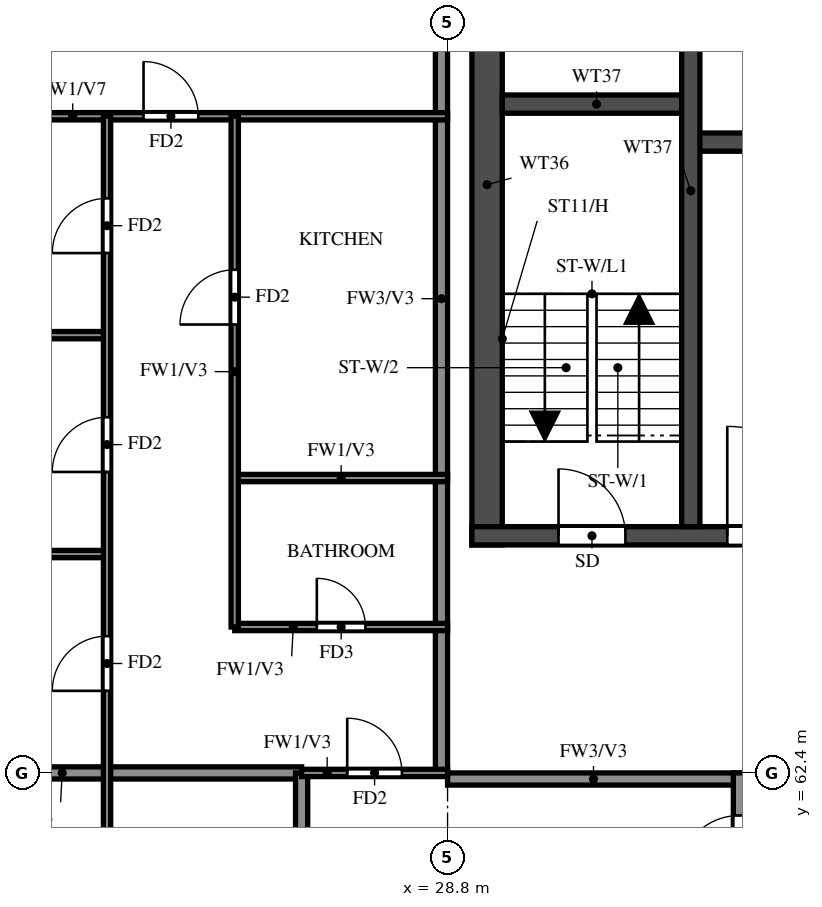
"""IFC4 building model, lengths in metres.
Left out: names, types, materials, properties, quantities, classifications, styles, units other than length and angle.
Written with IfcOpenShell. Run it as: python <this file> out.ifc"""

import sys

from ifc_helpers import new_model, si_unit, direction, frame, frame_2d, origin, place, context, subcontext, project, spatial, rectangle, extrude, element, fill, save


model = new_model("IFC4")
c1 = context("Model", 3, precision=1e-05, world=origin(), true_north=direction((0.0, 1.0)))
c2 = subcontext(c1, "Body", "Model", "MODEL_VIEW")
j1 = project(units=[si_unit("LENGTHUNIT", "METRE"), si_unit("PLANEANGLEUNIT", "RADIAN")], contexts=[c1])
p1 = place(None, origin())
s1 = spatial("IfcSite", under=j1, at=p1, CompositionType="ELEMENT")
p2 = place(p1, origin())
s2 = spatial("IfcBuilding", under=s1, at=p2, CompositionType="ELEMENT")
p3 = place(p2, frame((0.0, 0.0, 229.0)))
s3 = spatial("IfcBuildingStorey", under=s2, at=p3, CompositionType="ELEMENT", Elevation=229.0)
p4 = place(p3, frame((29.45, 66.15, 0.0), z_axis=(0.0, 0.0, 1.0), x_axis=(0.0, 1.0, 0.0)))
e1 = element("IfcWall", 1, at=p4, inside=s3, PredefinedType="SHEAR", context=c2, shape_type="SweptSolid", body=[
    extrude(rectangle(XDim=11.85, YDim=0.5, at=frame_2d((5.925, 0.0))), origin(), (0.0, 0.0, 1.0), 3.22),
])
p5 = place(p3, frame((29.2, 66.3, 0.0), z_axis=(0.0, 0.0, 1.0), x_axis=(1.0, 0.0, 0.0)))
e2 = element("IfcWall", 2, at=p5, inside=s3, PredefinedType="SHEAR", context=c2, shape_type="SweptSolid", body=[
    extrude(rectangle(XDim=42.4, YDim=0.3, at=frame_2d((21.2, 0.0))), origin(), (0.0, 0.0, 1.0), 3.22),
])
p6 = place(p5, frame((1.425, 0.0, 0.0)))
e3 = element("IfcOpeningElement", 3, at=p6, cuts=e2, PredefinedType="OPENING", context=c2, shape_type="SweptSolid", body=[
    extrude(rectangle(XDim=1.1, YDim=2.1, at=frame_2d((0.55, 1.05))), frame((0.0, 0.16, 0.0), z_axis=(0.0, -1.0, 0.0), x_axis=(1.0, 0.0, 0.0)), (0.0, 0.0, 1.0), 0.32),
])
p7 = place(p5, frame((4.2, 0.0, 0.0)))
e4 = element("IfcOpeningElement", 4, at=p7, cuts=e2, PredefinedType="OPENING", context=c2, shape_type="SweptSolid", body=[
    extrude(rectangle(XDim=1.8, YDim=2.1, at=frame_2d((0.9, 1.05))), frame((0.0, 0.16, 0.0), z_axis=(0.0, -1.0, 0.0), x_axis=(1.0, 0.0, 0.0)), (0.0, 0.0, 1.0), 0.32),
])
p8 = place(p3, frame((32.8, 72.775, 0.0), z_axis=(0.0, 0.0, 1.0), x_axis=(1.0, 0.0, 0.0)))
e5 = element("IfcWall", 5, at=p8, inside=s3, PredefinedType="SHEAR", context=c2, shape_type="SweptSolid", body=[
    extrude(rectangle(XDim=35.2, YDim=0.3, at=frame_2d((17.6, 0.0))), origin(), (0.0, 0.0, 1.0), 3.22),
])
p9 = place(p8, frame((19.8, 0.0, 0.0)))
e6 = element("IfcOpeningElement", 6, at=p9, cuts=e5, PredefinedType="OPENING", context=c2, shape_type="SweptSolid", body=[
    extrude(rectangle(XDim=1.1, YDim=2.1, at=frame_2d((0.55, 1.05))), frame((0.0, 0.16, 0.0), z_axis=(0.0, -1.0, 0.0), x_axis=(1.0, 0.0, 0.0)), (0.0, 0.0, 1.0), 0.32),
])
p10 = place(p8, frame((27.725, 0.0, 0.0)))
e7 = element("IfcOpeningElement", 7, at=p10, cuts=e5, PredefinedType="OPENING", context=c2, shape_type="SweptSolid", body=[
    extrude(rectangle(XDim=1.1, YDim=2.1, at=frame_2d((0.55, 1.05))), frame((0.0, 0.16, 0.0), z_axis=(0.0, -1.0, 0.0), x_axis=(1.0, 0.0, 0.0)), (0.0, 0.0, 1.0), 0.32),
])
p11 = place(p8, frame((30.325, 0.0, 0.0)))
e8 = element("IfcOpeningElement", 8, at=p11, cuts=e5, PredefinedType="OPENING", context=c2, shape_type="SweptSolid", body=[
    extrude(rectangle(XDim=1.1, YDim=2.1, at=frame_2d((0.55, 1.05))), frame((0.0, 0.16, 0.0), z_axis=(0.0, -1.0, 0.0), x_axis=(1.0, 0.0, 0.0)), (0.0, 0.0, 1.0), 0.32),
])
p12 = place(p8, frame((3.825, 0.0, 0.0)))
e9 = element("IfcOpeningElement", 9, at=p12, cuts=e5, PredefinedType="OPENING", context=c2, shape_type="SweptSolid", body=[
    extrude(rectangle(XDim=1.1, YDim=2.1, at=frame_2d((0.55, 1.05))), frame((0.0, 0.16, 0.0), z_axis=(0.0, -1.0, 0.0), x_axis=(1.0, 0.0, 0.0)), (0.0, 0.0, 1.0), 0.32),
])
p13 = place(p8, frame((6.575, 0.0, 0.0)))
e10 = element("IfcOpeningElement", 10, at=p13, cuts=e5, PredefinedType="OPENING", context=c2, shape_type="SweptSolid", body=[
    extrude(rectangle(XDim=1.1, YDim=2.1, at=frame_2d((0.55, 1.05))), frame((0.0, 0.16, 0.0), z_axis=(0.0, -1.0, 0.0), x_axis=(1.0, 0.0, 0.0)), (0.0, 0.0, 1.0), 0.32),
])
p14 = place(p8, frame((9.325, 0.0, 0.0)))
e11 = element("IfcOpeningElement", 11, at=p14, cuts=e5, PredefinedType="OPENING", context=c2, shape_type="SweptSolid", body=[
    extrude(rectangle(XDim=1.1, YDim=2.1, at=frame_2d((0.55, 1.05))), frame((0.0, 0.16, 0.0), z_axis=(0.0, -1.0, 0.0), x_axis=(1.0, 0.0, 0.0)), (0.0, 0.0, 1.0), 0.32),
])
p15 = place(p8, frame((12.075, 0.0, 0.0)))
e12 = element("IfcOpeningElement", 12, at=p15, cuts=e5, PredefinedType="OPENING", context=c2, shape_type="SweptSolid", body=[
    extrude(rectangle(XDim=1.1, YDim=2.1, at=frame_2d((0.55, 1.05))), frame((0.0, 0.16, 0.0), z_axis=(0.0, -1.0, 0.0), x_axis=(1.0, 0.0, 0.0)), (0.0, 0.0, 1.0), 0.32),
])
p16 = place(p8, frame((14.825, 0.0, 0.0)))
e13 = element("IfcOpeningElement", 13, at=p16, cuts=e5, PredefinedType="OPENING", context=c2, shape_type="SweptSolid", body=[
    extrude(rectangle(XDim=1.1, YDim=2.1, at=frame_2d((0.55, 1.05))), frame((0.0, 0.16, 0.0), z_axis=(0.0, -1.0, 0.0), x_axis=(1.0, 0.0, 0.0)), (0.0, 0.0, 1.0), 0.32),
])
p17 = place(p8, frame((17.575, 0.0, 0.0)))
e14 = element("IfcOpeningElement", 14, at=p17, cuts=e5, PredefinedType="OPENING", context=c2, shape_type="SweptSolid", body=[
    extrude(rectangle(XDim=1.1, YDim=2.1, at=frame_2d((0.55, 1.05))), frame((0.0, 0.16, 0.0), z_axis=(0.0, -1.0, 0.0), x_axis=(1.0, 0.0, 0.0)), (0.0, 0.0, 1.0), 0.32),
])
p18 = place(p8, frame((0.95, 0.0, 0.0)))
e15 = element("IfcOpeningElement", 15, at=p18, cuts=e5, PredefinedType="OPENING", context=c2, shape_type="SweptSolid", body=[
    extrude(rectangle(XDim=1.1, YDim=2.1, at=frame_2d((0.55, 1.05))), frame((0.0, 0.16, 0.0), z_axis=(0.0, -1.0, 0.0), x_axis=(1.0, 0.0, 0.0)), (0.0, 0.0, 1.0), 0.32),
])
p19 = place(p3, frame((29.7, 73.4, 0.0), z_axis=(0.0, 0.0, 1.0), x_axis=(1.0, 0.0, 0.0)))
e16 = element("IfcWall", 16, at=p19, inside=s3, PredefinedType="SHEAR", context=c2, shape_type="SweptSolid", body=[
    extrude(rectangle(XDim=3.1, YDim=0.3, at=frame_2d((1.55, 0.0))), origin(), (0.0, 0.0, 1.0), 3.22),
])
p20 = place(p3, frame((32.8, 66.45, 0.0), z_axis=(0.0, 0.0, 1.0), x_axis=(0.0, 1.0, 0.0)))
e17 = element("IfcWall", 17, at=p20, inside=s3, PredefinedType="SHEAR", context=c2, shape_type="SweptSolid", body=[
    extrude(rectangle(XDim=11.05, YDim=0.3, at=frame_2d((5.525, 0.0))), origin(), (0.0, 0.0, 1.0), 3.22),
])
p21 = place(p3, frame((28.8, 62.3, 0.0), z_axis=(0.0, 0.0, 1.0), x_axis=(1.0, 0.0, 0.0)))
e18 = element("IfcWall", 18, at=p21, inside=s3, PredefinedType="SOLIDWALL", context=c2, shape_type="SweptSolid", body=[
    extrude(rectangle(XDim=4.8, YDim=0.2, at=frame_2d((2.4, 0.0))), origin(), (0.0, 0.0, 1.0), 3.22),
])
p22 = place(p3, frame((28.7, 62.4, 0.0), z_axis=(0.0, 0.0, 1.0), x_axis=(0.0, 1.0, 0.0)))
e19 = element("IfcWall", 19, at=p22, inside=s3, PredefinedType="SOLIDWALL", context=c2, shape_type="SweptSolid", body=[
    extrude(rectangle(XDim=15.6, YDim=0.2, at=frame_2d((7.8, 0.0))), origin(), (0.0, 0.0, 1.0), 3.22),
])
p23 = place(p3, frame((33.6, 60.0, 0.0), z_axis=(0.0, 0.0, 1.0), x_axis=(0.0, 1.0, 0.0)))
e20 = element("IfcWall", 20, at=p23, inside=s3, PredefinedType="SOLIDWALL", context=c2, shape_type="SweptSolid", body=[
    extrude(rectangle(XDim=2.4, YDim=0.2, at=frame_2d((1.2, 0.0))), origin(), (0.0, 0.0, 1.0), 3.22),
])
p24 = place(p23, frame((0.7, 0.0, 0.0)))
e21 = element("IfcOpeningElement", 21, at=p24, cuts=e20, PredefinedType="OPENING", context=c2, shape_type="SweptSolid", body=[
    extrude(rectangle(XDim=1.0, YDim=2.1, at=frame_2d((0.5, 1.05))), frame((0.0, 0.11, 0.0), z_axis=(0.0, -1.0, 0.0), x_axis=(1.0, 0.0, 0.0)), (0.0, 0.0, 1.0), 0.22),
])
p25 = place(p3, frame((18.525, 62.4, 0.0), z_axis=(0.0, 0.0, 1.0), x_axis=(1.0, 0.0, 0.0)))
e22 = element("IfcWall", 22, at=p25, inside=s3, PredefinedType="SOLIDWALL", context=c2, shape_type="SweptSolid", body=[
    extrude(rectangle(XDim=7.875, YDim=0.2, at=frame_2d((3.938, 0.0))), origin(), (0.0, 0.0, 1.0), 3.22),
])
p26 = place(p3, frame((26.4, 60.0, 0.0), z_axis=(0.0, 0.0, 1.0), x_axis=(0.0, 1.0, 0.0)))
e23 = element("IfcWall", 23, at=p26, inside=s3, PredefinedType="SOLIDWALL", context=c2, shape_type="SweptSolid", body=[
    extrude(rectangle(XDim=2.4, YDim=0.2, at=frame_2d((1.2, 0.0))), origin(), (0.0, 0.0, 1.0), 3.22),
])
p27 = place(p3, frame((26.4, 62.4, 0.0), z_axis=(0.0, 0.0, 1.0), x_axis=(1.0, 0.0, 0.0)))
e24 = element("IfcWall", 24, at=p27, inside=s3, PredefinedType="PARTITIONING", context=c2, shape_type="SweptSolid", body=[
    extrude(rectangle(XDim=2.4, YDim=0.12, at=frame_2d((1.2, 0.0))), origin(), (0.0, 0.0, 1.0), 3.22),
])
p28 = place(p27, frame((0.75, 0.0, 0.0)))
e25 = element("IfcOpeningElement", 25, at=p28, cuts=e24, PredefinedType="OPENING", context=c2, shape_type="SweptSolid", body=[
    extrude(rectangle(XDim=0.9, YDim=2.1, at=frame_2d((0.45, 1.05))), frame((0.0, 0.07, 0.0), z_axis=(0.0, -1.0, 0.0), x_axis=(1.0, 0.0, 0.0)), (0.0, 0.0, 1.0), 0.14),
])
p29 = place(p3, frame((25.3, 64.8, 0.0), z_axis=(0.0, 0.0, 1.0), x_axis=(1.0, 0.0, 0.0)))
e26 = element("IfcWall", 26, at=p29, inside=s3, PredefinedType="PARTITIONING", context=c2, shape_type="SweptSolid", body=[
    extrude(rectangle(XDim=3.5, YDim=0.12, at=frame_2d((1.75, 0.0))), origin(), (0.0, 0.0, 1.0), 3.22),
])
p30 = place(p29, frame((1.35, 0.0, 0.0)))
e27 = element("IfcOpeningElement", 27, at=p30, cuts=e26, PredefinedType="OPENING", context=c2, shape_type="SweptSolid", body=[
    extrude(rectangle(XDim=0.8, YDim=2.1, at=frame_2d((0.4, 1.05))), frame((0.0, 0.07, 0.0), z_axis=(0.0, -1.0, 0.0), x_axis=(1.0, 0.0, 0.0)), (0.0, 0.0, 1.0), 0.14),
])
p31 = place(p3, frame((18.525, 66.0, 0.0), z_axis=(0.0, 0.0, 1.0), x_axis=(1.0, 0.0, 0.0)))
e28 = element("IfcWall", 28, at=p31, inside=s3, PredefinedType="PARTITIONING", context=c2, shape_type="SweptSolid", body=[
    extrude(rectangle(XDim=4.675, YDim=0.12, at=frame_2d((2.337, 0.0))), origin(), (0.0, 0.0, 1.0), 2.32),
])
p32 = place(p3, frame((25.3, 67.25, 0.0), z_axis=(0.0, 0.0, 1.0), x_axis=(1.0, 0.0, 0.0)))
e29 = element("IfcWall", 29, at=p32, inside=s3, PredefinedType="PARTITIONING", context=c2, shape_type="SweptSolid", body=[
    extrude(rectangle(XDim=3.5, YDim=0.12, at=frame_2d((1.75, 0.0))), origin(), (0.0, 0.0, 1.0), 3.22),
])
p33 = place(p3, frame((18.525, 69.6, 0.0), z_axis=(0.0, 0.0, 1.0), x_axis=(1.0, 0.0, 0.0)))
e30 = element("IfcWall", 30, at=p33, inside=s3, PredefinedType="PARTITIONING", context=c2, shape_type="SweptSolid", body=[
    extrude(rectangle(XDim=4.675, YDim=0.12, at=frame_2d((2.337, 0.0))), origin(), (0.0, 0.0, 1.0), 3.22),
])
p34 = place(p3, frame((18.525, 73.2, 0.0), z_axis=(0.0, 0.0, 1.0), x_axis=(1.0, 0.0, 0.0)))
e31 = element("IfcWall", 31, at=p34, inside=s3, PredefinedType="PARTITIONING", context=c2, shape_type="SweptSolid", body=[
    extrude(rectangle(XDim=10.275, YDim=0.12, at=frame_2d((5.138, 0.0))), origin(), (0.0, 0.0, 1.0), 2.32),
])
p35 = place(p34, frame((5.275, 0.0, 0.0)))
e32 = element("IfcOpeningElement", 32, at=p35, cuts=e31, PredefinedType="OPENING", context=c2, shape_type="SweptSolid", body=[
    extrude(rectangle(XDim=0.9, YDim=2.1, at=frame_2d((0.45, 1.05))), frame((0.0, 0.07, 0.0), z_axis=(0.0, -1.0, 0.0), x_axis=(1.0, 0.0, 0.0)), (0.0, 0.0, 1.0), 0.14),
])
p36 = place(p3, frame((23.2, 48.0, 0.0), z_axis=(0.0, 0.0, 1.0), x_axis=(0.0, 1.0, 0.0)))
e33 = element("IfcWall", 33, at=p36, inside=s3, PredefinedType="PARTITIONING", context=c2, shape_type="SweptSolid", body=[
    extrude(rectangle(XDim=25.2, YDim=0.12, at=frame_2d((12.6, 0.0))), origin(), (0.0, 0.0, 1.0), 3.22),
])
p37 = place(p36, frame((1.35, 0.0, 0.0)))
e34 = element("IfcOpeningElement", 34, at=p37, cuts=e33, PredefinedType="OPENING", context=c2, shape_type="SweptSolid", body=[
    extrude(rectangle(XDim=0.9, YDim=2.1, at=frame_2d((0.45, 1.05))), frame((0.0, 0.07, 0.0), z_axis=(0.0, -1.0, 0.0), x_axis=(1.0, 0.0, 0.0)), (0.0, 0.0, 1.0), 0.14),
])
p38 = place(p36, frame((4.95, 0.0, 0.0)))
e35 = element("IfcOpeningElement", 35, at=p38, cuts=e33, PredefinedType="OPENING", context=c2, shape_type="SweptSolid", body=[
    extrude(rectangle(XDim=0.9, YDim=2.1, at=frame_2d((0.45, 1.05))), frame((0.0, 0.07, 0.0), z_axis=(0.0, -1.0, 0.0), x_axis=(1.0, 0.0, 0.0)), (0.0, 0.0, 1.0), 0.14),
])
p39 = place(p36, frame((10.05, 0.0, 0.0)))
e36 = element("IfcOpeningElement", 36, at=p39, cuts=e33, PredefinedType="OPENING", context=c2, shape_type="SweptSolid", body=[
    extrude(rectangle(XDim=1.5, YDim=2.1, at=frame_2d((0.75, 1.05))), frame((0.0, 0.07, 0.0), z_axis=(0.0, -1.0, 0.0), x_axis=(1.0, 0.0, 0.0)), (0.0, 0.0, 1.0), 0.14),
])
p40 = place(p36, frame((15.75, 0.0, 0.0)))
e37 = element("IfcOpeningElement", 37, at=p40, cuts=e33, PredefinedType="OPENING", context=c2, shape_type="SweptSolid", body=[
    extrude(rectangle(XDim=0.9, YDim=2.1, at=frame_2d((0.45, 1.05))), frame((0.0, 0.07, 0.0), z_axis=(0.0, -1.0, 0.0), x_axis=(1.0, 0.0, 0.0)), (0.0, 0.0, 1.0), 0.14),
])
p41 = place(p36, frame((19.35, 0.0, 0.0)))
e38 = element("IfcOpeningElement", 38, at=p41, cuts=e33, PredefinedType="OPENING", context=c2, shape_type="SweptSolid", body=[
    extrude(rectangle(XDim=0.9, YDim=2.1, at=frame_2d((0.45, 1.05))), frame((0.0, 0.07, 0.0), z_axis=(0.0, -1.0, 0.0), x_axis=(1.0, 0.0, 0.0)), (0.0, 0.0, 1.0), 0.14),
])
p42 = place(p36, frame((22.95, 0.0, 0.0)))
e39 = element("IfcOpeningElement", 39, at=p42, cuts=e33, PredefinedType="OPENING", context=c2, shape_type="SweptSolid", body=[
    extrude(rectangle(XDim=0.9, YDim=2.1, at=frame_2d((0.45, 1.05))), frame((0.0, 0.07, 0.0), z_axis=(0.0, -1.0, 0.0), x_axis=(1.0, 0.0, 0.0)), (0.0, 0.0, 1.0), 0.14),
])
p43 = place(p3, frame((25.3, 64.8, 0.0), z_axis=(0.0, 0.0, 1.0), x_axis=(0.0, 1.0, 0.0)))
e40 = element("IfcWall", 40, at=p43, inside=s3, PredefinedType="PARTITIONING", context=c2, shape_type="SweptSolid", body=[
    extrude(rectangle(XDim=8.4, YDim=0.12, at=frame_2d((4.2, 0.0))), origin(), (0.0, 0.0, 1.0), 3.22),
])
p44 = place(p43, frame((4.975, 0.0, 0.0)))
e41 = element("IfcOpeningElement", 41, at=p44, cuts=e40, PredefinedType="OPENING", context=c2, shape_type="SweptSolid", body=[
    extrude(rectangle(XDim=0.9, YDim=2.1, at=frame_2d((0.45, 1.05))), frame((0.0, 0.07, 0.0), z_axis=(0.0, -1.0, 0.0), x_axis=(1.0, 0.0, 0.0)), (0.0, 0.0, 1.0), 0.14),
])
p45 = place(p6, origin())
e42 = element("IfcDoor", 42, at=p45, inside=s3, OperationType="SINGLE_SWING_LEFT", PredefinedType="DOOR", context=c2, shape_type="SweptSolid", body=[
    extrude(rectangle(XDim=1.1, YDim=2.1, at=frame_2d((0.55, 1.05))), frame((0.0, 0.025, 0.0), z_axis=(0.0, -1.0, 0.0), x_axis=(1.0, 0.0, 0.0)), (0.0, 0.0, 1.0), 0.05),
])
fill(e3, e42)
p46 = place(p7, origin())
e43 = element("IfcDoor", 43, at=p46, inside=s3, OperationType="DOUBLE_DOOR_SINGLE_SWING", PredefinedType="DOOR", context=c2, shape_type="SweptSolid", body=[
    extrude(rectangle(XDim=1.8, YDim=2.1, at=frame_2d((0.9, 1.05))), frame((0.0, 0.025, 0.0), z_axis=(0.0, -1.0, 0.0), x_axis=(1.0, 0.0, 0.0)), (0.0, 0.0, 1.0), 0.05),
])
fill(e4, e43)
p47 = place(p28, origin())
e44 = element("IfcDoor", 44, at=p47, inside=s3, OperationType="SINGLE_SWING_RIGHT", PredefinedType="DOOR", context=c2, shape_type="SweptSolid", body=[
    extrude(rectangle(XDim=0.9, YDim=2.1, at=frame_2d((0.45, 1.05))), frame((0.0, 0.025, 0.0), z_axis=(0.0, -1.0, 0.0), x_axis=(1.0, 0.0, 0.0)), (0.0, 0.0, 1.0), 0.05),
])
fill(e25, e44)
p48 = place(p24, origin())
e45 = element("IfcDoor", 45, at=p48, inside=s3, OperationType="SINGLE_SWING_LEFT", PredefinedType="DOOR", context=c2, shape_type="SweptSolid", body=[
    extrude(rectangle(XDim=1.0, YDim=2.1, at=frame_2d((0.5, 1.05))), frame((0.0, 0.025, 0.0), z_axis=(0.0, -1.0, 0.0), x_axis=(1.0, 0.0, 0.0)), (0.0, 0.0, 1.0), 0.05),
])
fill(e21, e45)
p49 = place(p40, origin())
e46 = element("IfcDoor", 46, at=p49, inside=s3, OperationType="SINGLE_SWING_LEFT", PredefinedType="DOOR", context=c2, shape_type="SweptSolid", body=[
    extrude(rectangle(XDim=0.9, YDim=2.1, at=frame_2d((0.45, 1.05))), frame((0.0, 0.025, 0.0), z_axis=(0.0, -1.0, 0.0), x_axis=(1.0, 0.0, 0.0)), (0.0, 0.0, 1.0), 0.05),
])
fill(e37, e46)
p50 = place(p41, origin())
e47 = element("IfcDoor", 47, at=p50, inside=s3, OperationType="SINGLE_SWING_RIGHT", PredefinedType="DOOR", context=c2, shape_type="SweptSolid", body=[
    extrude(rectangle(XDim=0.9, YDim=2.1, at=frame_2d((0.45, 1.05))), frame((0.0, 0.025, 0.0), z_axis=(0.0, -1.0, 0.0), x_axis=(1.0, 0.0, 0.0)), (0.0, 0.0, 1.0), 0.05),
])
fill(e38, e47)
p51 = place(p42, origin())
e48 = element("IfcDoor", 48, at=p51, inside=s3, OperationType="SINGLE_SWING_LEFT", PredefinedType="DOOR", context=c2, shape_type="SweptSolid", body=[
    extrude(rectangle(XDim=0.9, YDim=2.1, at=frame_2d((0.45, 1.05))), frame((0.0, 0.025, 0.0), z_axis=(0.0, -1.0, 0.0), x_axis=(1.0, 0.0, 0.0)), (0.0, 0.0, 1.0), 0.05),
])
fill(e39, e48)
p52 = place(p35, origin())
e49 = element("IfcDoor", 49, at=p52, inside=s3, OperationType="SINGLE_SWING_LEFT", PredefinedType="DOOR", context=c2, shape_type="SweptSolid", body=[
    extrude(rectangle(XDim=0.9, YDim=2.1, at=frame_2d((0.45, 1.05))), frame((0.0, 0.025, 0.0), z_axis=(0.0, -1.0, 0.0), x_axis=(1.0, 0.0, 0.0)), (0.0, 0.0, 1.0), 0.05),
])
fill(e32, e49)
p53 = place(p30, origin())
e50 = element("IfcDoor", 50, at=p53, inside=s3, OperationType="SINGLE_SWING_RIGHT", PredefinedType="DOOR", context=c2, shape_type="SweptSolid", body=[
    extrude(rectangle(XDim=0.8, YDim=2.1, at=frame_2d((0.4, 1.05))), frame((0.0, 0.025, 0.0), z_axis=(0.0, -1.0, 0.0), x_axis=(1.0, 0.0, 0.0)), (0.0, 0.0, 1.0), 0.05),
])
fill(e27, e50)
p54 = place(p44, origin())
e51 = element("IfcDoor", 51, at=p54, inside=s3, OperationType="SINGLE_SWING_LEFT", PredefinedType="DOOR", context=c2, shape_type="SweptSolid", body=[
    extrude(rectangle(XDim=0.9, YDim=2.1, at=frame_2d((0.45, 1.05))), frame((0.0, 0.025, 0.0), z_axis=(0.0, -1.0, 0.0), x_axis=(1.0, 0.0, 0.0)), (0.0, 0.0, 1.0), 0.05),
])
fill(e41, e51)
save(model, sys.argv[1])
